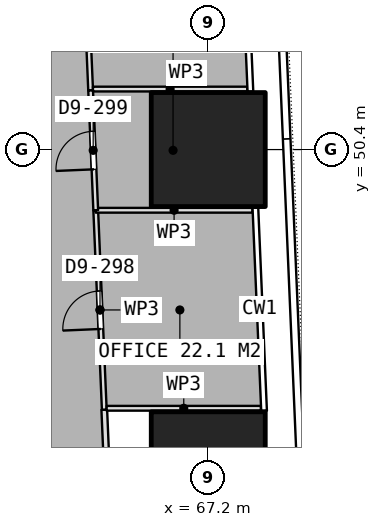
"""IFC4 building model, lengths in metres.
Left out: names, types, materials, properties, quantities, classifications, styles, units other than length and angle.
Written with IfcOpenShell. Run it as: python <this file> out.ifc"""

import sys

from ifc_helpers import new_model, si_unit, direction, frame, frame_2d, origin, origin_2d, place, context, subcontext, project, spatial, rectangle, extrude, element, fill, save


model = new_model("IFC4")
c1 = context("Model", 3, precision=1e-05, world=origin(), true_north=direction((0.0, 1.0)))
c2 = subcontext(c1, "Body", "Model", "MODEL_VIEW")
j1 = project(units=[si_unit("LENGTHUNIT", "METRE"), si_unit("PLANEANGLEUNIT", "RADIAN")], contexts=[c1])
p1 = place(None, origin())
s1 = spatial("IfcSite", under=j1, at=p1, CompositionType="ELEMENT")
p2 = place(p1, origin())
s2 = spatial("IfcBuilding", under=s1, at=p2, CompositionType="ELEMENT")
p3 = place(p2, frame((0.0, 0.0, 81.65)))
s3 = spatial("IfcBuildingStorey", under=s2, at=p3, CompositionType="ELEMENT", Elevation=81.65)
for number, where, z_axis, x_axis in (
    (1, (67.2, 42.0, 0.0), (0.0, 0.0, 1.0), (1.0, 0.0, 0.0)),
    (2, (67.2, 50.4, 0.0), (0.0, 0.0, 1.0), (1.0, 0.0, 0.0)),
):
    element("IfcColumn", number, at=place(p3, frame(where, z_axis=z_axis, x_axis=x_axis)), inside=s3, PredefinedType="COLUMN", context=c2, shape_type="SweptSolid", body=[
        extrude(rectangle(XDim=3.0, YDim=3.0, at=origin_2d()), origin(), (0.0, 0.0, 1.0), 3.75),
    ])
p4 = place(p3, frame((64.464, 43.557, 0.0), z_axis=(0.0, 0.0, 1.0), x_axis=(-0.042868225882, 0.999080735081, 0.0)))
e3 = element("IfcWall", 3, at=p4, inside=s3, PredefinedType="PARTITIONING", context=c2, shape_type="SweptSolid", body=[
    extrude(rectangle(XDim=5.251, YDim=0.125, at=frame_2d((2.625, 0.0))), origin(), (0.0, 0.0, 1.0), 3.4),
])
p5 = place(p4, frame((2.125, 0.0, 0.0)))
e4 = element("IfcOpeningElement", 4, at=p5, cuts=e3, PredefinedType="OPENING", context=c2, shape_type="SweptSolid", body=[
    extrude(rectangle(XDim=1.0, YDim=2.1, at=frame_2d((0.5, 1.05))), frame((0.0, 0.073, 0.0), z_axis=(0.0, -1.0, 0.0), x_axis=(1.0, 0.0, 0.0)), (0.0, 0.0, 1.0), 0.145),
])
p6 = place(p3, frame((64.239, 48.803, 0.0), z_axis=(0.0, 0.0, 1.0), x_axis=(1.0, 0.0, 0.0)))
e5 = element("IfcWall", 5, at=p6, inside=s3, PredefinedType="PARTITIONING", context=c2, shape_type="SweptSolid", body=[
    extrude(rectangle(XDim=4.124, YDim=0.125, at=frame_2d((2.062, 0.0))), origin(), (0.0, 0.0, 1.0), 3.4),
])
p7 = place(p3, frame((68.586, 43.593, 0.0), z_axis=(0.0, 0.0, 1.0), x_axis=(-1.0, 0.0, 0.0)))
e6 = element("IfcWall", 6, at=p7, inside=s3, PredefinedType="PARTITIONING", context=c2, shape_type="SweptSolid", body=[
    extrude(rectangle(XDim=4.061, YDim=0.125, at=frame_2d((2.031, 0.0))), origin(), (0.0, 0.0, 1.0), 3.4),
])
p8 = place(p3, frame((64.239, 48.804, 0.0), z_axis=(0.0, 0.0, 1.0), x_axis=(-0.042483490494, 0.999097168966, 0.0)))
e7 = element("IfcWall", 7, at=p8, inside=s3, PredefinedType="PARTITIONING", context=c2, shape_type="SweptSolid", body=[
    extrude(rectangle(XDim=3.155, YDim=0.125, at=frame_2d((1.578, 0.0))), origin(), (0.0, 0.0, 1.0), 3.4),
])
p9 = place(p8, frame((1.077, 0.0, 0.0)))
e8 = element("IfcOpeningElement", 8, at=p9, cuts=e7, PredefinedType="OPENING", context=c2, shape_type="SweptSolid", body=[
    extrude(rectangle(XDim=1.0, YDim=2.1, at=frame_2d((0.5, 1.05))), frame((0.0, 0.073, 0.0), z_axis=(0.0, -1.0, 0.0), x_axis=(1.0, 0.0, 0.0)), (0.0, 0.0, 1.0), 0.145),
])
p10 = place(p3, frame((64.166, 51.992, 0.0), z_axis=(0.0, 0.0, 1.0), x_axis=(1.0, 0.0, 0.0)))
e9 = element("IfcWall", 9, at=p10, inside=s3, PredefinedType="PARTITIONING", context=c2, shape_type="SweptSolid", body=[
    extrude(rectangle(XDim=4.061, YDim=0.125, at=frame_2d((2.031, 0.0))), origin(), (0.0, 0.0, 1.0), 3.4),
])
p11 = place(p3, frame((64.105, 51.957, 0.0), z_axis=(0.0, 0.0, 1.0), x_axis=(-0.042654443866, 0.999089885055, 0.0)))
e10 = element("IfcWall", 10, at=p11, inside=s3, PredefinedType="PARTITIONING", context=c2, shape_type="SweptSolid", body=[
    extrude(rectangle(XDim=4.453, YDim=0.125, at=frame_2d((2.227, 0.0))), origin(), (0.0, 0.0, 1.0), 3.4),
])
p12 = place(p3, frame((64.464, 43.556, 0.0), z_axis=(0.0, 0.0, 1.0), x_axis=(0.042509888652, -0.999096046117, 0.0)))
e11 = element("IfcWall", 11, at=p12, inside=s3, PredefinedType="PARTITIONING", context=c2, shape_type="SweptSolid", body=[
    extrude(rectangle(XDim=3.222, YDim=0.15, at=frame_2d((1.611, 0.0))), origin(), (0.0, 0.0, 1.0), 3.4),
])
p13 = place(p5, origin())
e12 = element("IfcDoor", 12, at=p13, inside=s3, OperationType="SINGLE_SWING_LEFT", PredefinedType="DOOR", context=c2, shape_type="SweptSolid", body=[
    extrude(rectangle(XDim=1.0, YDim=2.1, at=frame_2d((0.5, 1.05))), frame((0.0, 0.025, 0.0), z_axis=(0.0, -1.0, 0.0), x_axis=(1.0, 0.0, 0.0)), (0.0, 0.0, 1.0), 0.05),
])
fill(e4, e12)
p14 = place(p9, origin())
e13 = element("IfcDoor", 13, at=p14, inside=s3, OperationType="SINGLE_SWING_LEFT", PredefinedType="DOOR", context=c2, shape_type="SweptSolid", body=[
    extrude(rectangle(XDim=1.0, YDim=2.1, at=frame_2d((0.5, 1.05))), frame((0.0, 0.025, 0.0), z_axis=(0.0, -1.0, 0.0), x_axis=(1.0, 0.0, 0.0)), (0.0, 0.0, 1.0), 0.05),
])
fill(e8, e13)
save(model, sys.argv[1])
